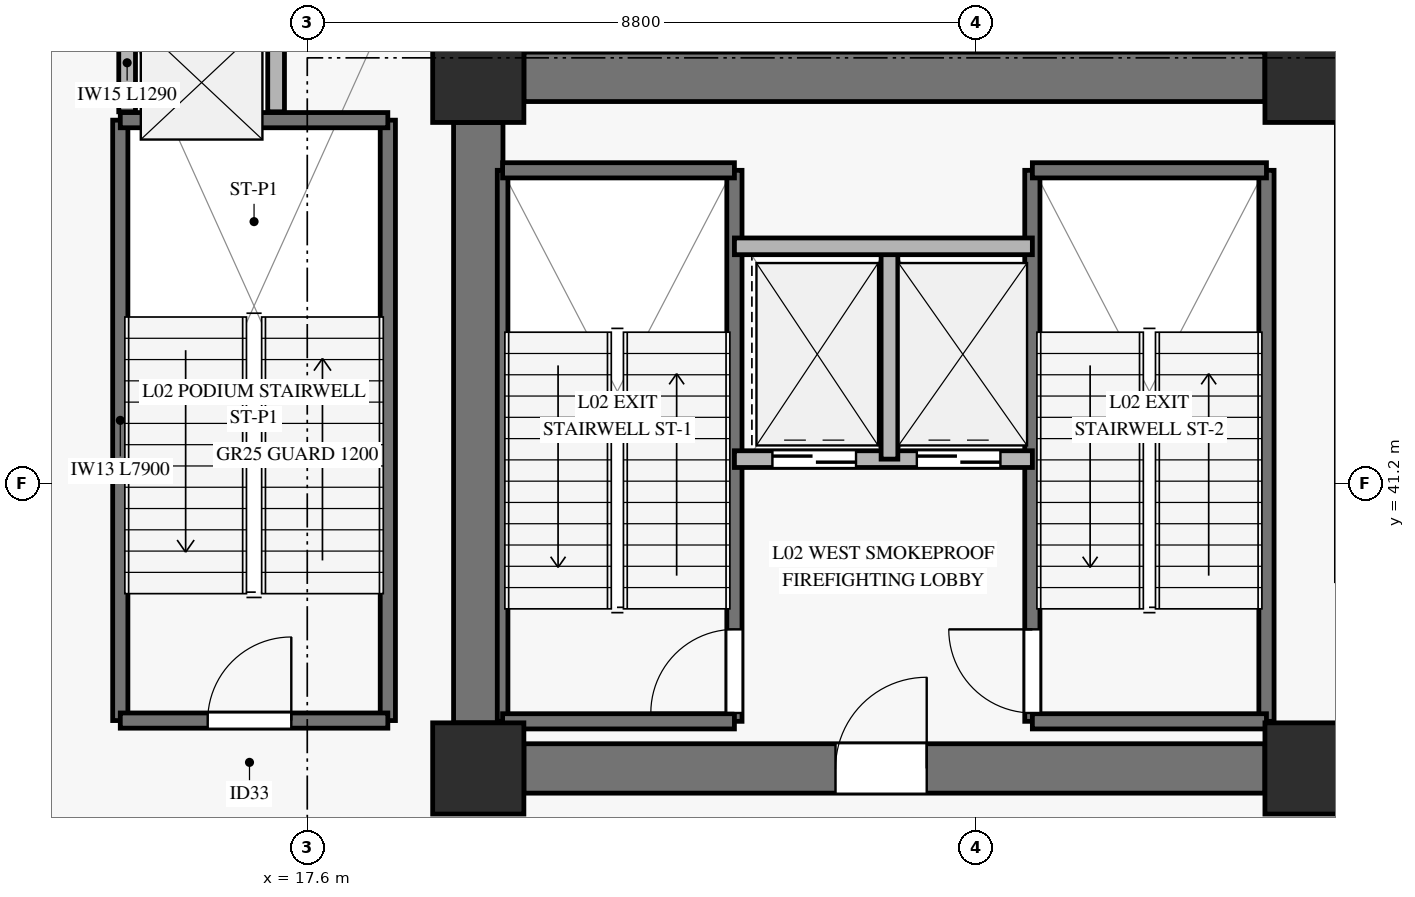
"""IFC4 building model, lengths in metres.
Left out: names, types, materials, properties, quantities, classifications, styles, units other than length and angle.
Written with IfcOpenShell. Run it as: python <this file> out.ifc"""

import sys

from ifc_helpers import new_model, si_unit, direction, frame, frame_2d, origin, origin_2d, place, context, subcontext, project, spatial, rectangle, extrude, source, transform, mapped, element, fill, save


model = new_model("IFC4")
c1 = context("Model", 3, precision=1e-05, world=origin(), true_north=direction((0.0, 1.0)))
c2 = subcontext(c1, "Body", "Model", "MODEL_VIEW")
j1 = project(units=[si_unit("LENGTHUNIT", "METRE"), si_unit("PLANEANGLEUNIT", "RADIAN")], contexts=[c1])
p1 = place(None, origin())
s1 = spatial("IfcSite", under=j1, at=p1, CompositionType="ELEMENT")
p2 = place(p1, origin())
s2 = spatial("IfcBuilding", under=s1, at=p2, CompositionType="ELEMENT")
p3 = place(p2, frame((0.0, 0.0, 5.6)))
s3 = spatial("IfcBuildingStorey", under=s2, at=p3, CompositionType="ELEMENT", Elevation=5.6)
m1 = source(origin(), c2, "Body", "SweptSolid", [
    extrude(rectangle(XDim=1.2, YDim=1.2, at=origin_2d()), origin(), (0.0, 0.0, 1.0), 4.54),
])
for number, where, z_axis, x_axis in (
    (1, (19.85, 37.45, 0.0), (0.0, 0.0, 1.0), (1.0, 0.0, 0.0)),
    (2, (19.85, 46.55, 0.0), (0.0, 0.0, 1.0), (1.0, 0.0, 0.0)),
    (3, (30.8, 37.45, 0.0), (0.0, 0.0, 1.0), (1.0, 0.0, 0.0)),
    (4, (30.8, 46.55, 0.0), (0.0, 0.0, 1.0), (1.0, 0.0, 0.0)),
):
    element("IfcColumn", number, at=place(p3, frame(where, z_axis=z_axis, x_axis=x_axis)), inside=s3, PredefinedType="PILASTER", context=c2, shape_type="MappedRepresentation", body=[
        mapped(m1, transform((0.0, 0.0, 0.0), x_axis=(1.0, 0.0, 0.0), y_axis=(0.0, 1.0, 0.0), z_axis=(0.0, 0.0, 1.0), scale=1.0)),
    ])
p4 = place(p3, frame((20.45, 46.55, 0.0), z_axis=(0.0, 0.0, 1.0), x_axis=(1.0, 0.0, 0.0)))
e5 = element("IfcWall", 5, at=p4, inside=s3, PredefinedType="SHEAR", context=c2, shape_type="SweptSolid", body=[
    extrude(rectangle(XDim=9.75, YDim=0.65, at=frame_2d((4.875, 0.0))), origin(), (0.0, 0.0, 1.0), 4.54),
])
p5 = place(p3, frame((20.45, 37.45, 0.0), z_axis=(0.0, 0.0, 1.0), x_axis=(1.0, 0.0, 0.0)))
e6 = element("IfcWall", 6, at=p5, inside=s3, PredefinedType="SHEAR", context=c2, shape_type="SweptSolid", body=[
    extrude(rectangle(XDim=9.75, YDim=0.65, at=frame_2d((4.875, 0.0))), origin(), (0.0, 0.0, 1.0), 4.54),
])
p6 = place(p5, frame((4.1, 0.0, 0.0)))
e7 = element("IfcOpeningElement", 7, at=p6, cuts=e6, PredefinedType="OPENING", context=c2, shape_type="SweptSolid", body=[
    extrude(rectangle(XDim=1.2, YDim=2.15, at=frame_2d((0.6, 1.075))), frame((0.0, 0.335, 0.0), z_axis=(0.0, -1.0, 0.0), x_axis=(1.0, 0.0, 0.0)), (0.0, 0.0, 1.0), 0.67),
])
p7 = place(p3, frame((19.85, 38.05, 0.0), z_axis=(0.0, 0.0, 1.0), x_axis=(0.0, 1.0, 0.0)))
e8 = element("IfcWall", 8, at=p7, inside=s3, PredefinedType="SHEAR", context=c2, shape_type="SweptSolid", body=[
    extrude(rectangle(XDim=7.9, YDim=0.65, at=frame_2d((3.95, 0.0))), origin(), (0.0, 0.0, 1.0), 4.54),
])
p8 = place(p3, frame((20.17, 38.07, 0.0), z_axis=(0.0, 0.0, 1.0), x_axis=(0.0, 1.0, 0.0)))
e9 = element("IfcWall", 9, at=p8, inside=s3, PredefinedType="SOLIDWALL", context=c2, shape_type="SweptSolid", body=[
    extrude(rectangle(XDim=7.25, YDim=0.14, at=frame_2d((3.625, 0.0))), origin(), (0.0, 0.0, 1.0), 4.8),
])
p9 = place(p3, frame((23.22, 38.07, 0.0), z_axis=(0.0, 0.0, 1.0), x_axis=(0.0, 1.0, 0.0)))
e10 = element("IfcWall", 10, at=p9, inside=s3, PredefinedType="SOLIDWALL", context=c2, shape_type="SweptSolid", body=[
    extrude(rectangle(XDim=7.25, YDim=0.2, at=frame_2d((3.625, 0.0))), origin(), (0.0, 0.0, 1.0), 4.8),
])
p10 = place(p9, frame((0.11, 0.0, 0.0)))
e11 = element("IfcOpeningElement", 11, at=p10, cuts=e10, PredefinedType="OPENING", context=c2, shape_type="SweptSolid", body=[
    extrude(rectangle(XDim=1.1, YDim=2.15, at=frame_2d((0.55, 1.075))), frame((0.0, 0.11, 0.0), z_axis=(0.0, -1.0, 0.0), x_axis=(1.0, 0.0, 0.0)), (0.0, 0.0, 1.0), 0.22),
])
for number, where, z_axis, x_axis in (
    (12, (20.17, 45.32, 0.0), (0.0, 0.0, 1.0), (1.0, 0.0, 0.0)),
    (13, (20.17, 38.07, 0.0), (0.0, 0.0, 1.0), (1.0, 0.0, 0.0)),
):
    element("IfcWall", number, at=place(p3, frame(where, z_axis=z_axis, x_axis=x_axis)), inside=s3, PredefinedType="SOLIDWALL", context=c2, shape_type="SweptSolid", body=[
        extrude(rectangle(XDim=3.05, YDim=0.2, at=frame_2d((1.525, 0.0))), origin(), (0.0, 0.0, 1.0), 4.8),
    ])
p11 = place(p3, frame((27.14, 38.07, 0.0), z_axis=(0.0, 0.0, 1.0), x_axis=(0.0, 1.0, 0.0)))
e14 = element("IfcWall", 14, at=p11, inside=s3, PredefinedType="SOLIDWALL", context=c2, shape_type="SweptSolid", body=[
    extrude(rectangle(XDim=7.25, YDim=0.2, at=frame_2d((3.625, 0.0))), origin(), (0.0, 0.0, 1.0), 4.8),
])
p12 = place(p11, frame((0.11, 0.0, 0.0)))
e15 = element("IfcOpeningElement", 15, at=p12, cuts=e14, PredefinedType="OPENING", context=c2, shape_type="SweptSolid", body=[
    extrude(rectangle(XDim=1.1, YDim=2.15, at=frame_2d((0.55, 1.075))), frame((0.0, 0.11, 0.0), z_axis=(0.0, -1.0, 0.0), x_axis=(1.0, 0.0, 0.0)), (0.0, 0.0, 1.0), 0.22),
])
p13 = place(p3, frame((30.22, 38.07, 0.0), z_axis=(0.0, 0.0, 1.0), x_axis=(0.0, 1.0, 0.0)))
e16 = element("IfcWall", 16, at=p13, inside=s3, PredefinedType="SOLIDWALL", context=c2, shape_type="SweptSolid", body=[
    extrude(rectangle(XDim=7.25, YDim=0.2, at=frame_2d((3.625, 0.0))), origin(), (0.0, 0.0, 1.0), 4.8),
])
for number, where, z_axis, x_axis in (
    (17, (27.14, 45.32, 0.0), (0.0, 0.0, 1.0), (1.0, 0.0, 0.0)),
    (18, (27.14, 38.07, 0.0), (0.0, 0.0, 1.0), (1.0, 0.0, 0.0)),
):
    element("IfcWall", number, at=place(p3, frame(where, z_axis=z_axis, x_axis=x_axis)), inside=s3, PredefinedType="SOLIDWALL", context=c2, shape_type="SweptSolid", body=[
        extrude(rectangle(XDim=3.08, YDim=0.2, at=frame_2d((1.54, 0.0))), origin(), (0.0, 0.0, 1.0), 4.8),
    ])
p14 = place(p3, frame((23.22, 41.52, 0.0), z_axis=(0.0, 0.0, 1.0), x_axis=(1.0, 0.0, 0.0)))
e19 = element("IfcWall", 19, at=p14, inside=s3, PredefinedType="SOLIDWALL", context=c2, shape_type="SweptSolid", body=[
    extrude(rectangle(XDim=3.92, YDim=0.22, at=frame_2d((1.96, 0.0))), origin(), (0.0, 0.0, 1.0), 4.54),
])
p15 = place(p14, frame((0.5, 0.0, 0.0)))
e20 = element("IfcOpeningElement", 20, at=p15, cuts=e19, PredefinedType="OPENING", context=c2, shape_type="SweptSolid", body=[
    extrude(rectangle(XDim=1.1, YDim=2.2, at=frame_2d((0.55, 1.1))), frame((0.0, 0.12, 0.0), z_axis=(0.0, -1.0, 0.0), x_axis=(1.0, 0.0, 0.0)), (0.0, 0.0, 1.0), 0.24),
])
p16 = place(p14, frame((2.4, 0.0, 0.0)))
e21 = element("IfcOpeningElement", 21, at=p16, cuts=e19, PredefinedType="OPENING", context=c2, shape_type="SweptSolid", body=[
    extrude(rectangle(XDim=1.1, YDim=2.2, at=frame_2d((0.55, 1.1))), frame((0.0, 0.12, 0.0), z_axis=(0.0, -1.0, 0.0), x_axis=(1.0, 0.0, 0.0)), (0.0, 0.0, 1.0), 0.24),
])
p17 = place(p3, frame((25.26, 41.52, 0.0), z_axis=(0.0, 0.0, 1.0), x_axis=(0.0, 1.0, 0.0)))
e22 = element("IfcWall", 22, at=p17, inside=s3, PredefinedType="SOLIDWALL", context=c2, shape_type="SweptSolid", body=[
    extrude(rectangle(XDim=2.8, YDim=0.22, at=frame_2d((1.4, 0.0))), origin(), (0.0, 0.0, 1.0), 4.54),
])
p18 = place(p3, frame((23.22, 44.32, 0.0), z_axis=(0.0, 0.0, 1.0), x_axis=(1.0, 0.0, 0.0)))
e23 = element("IfcWall", 23, at=p18, inside=s3, PredefinedType="SOLIDWALL", context=c2, shape_type="SweptSolid", body=[
    extrude(rectangle(XDim=3.92, YDim=0.22, at=frame_2d((1.96, 0.0))), origin(), (0.0, 0.0, 1.0), 4.54),
])
for number, where, z_axis, x_axis in (
    (24, (15.14, 38.08, 0.0), (0.0, 0.0, 1.0), (0.0, 1.0, 0.0)),
    (25, (18.66, 38.08, 0.0), (0.0, 0.0, 1.0), (0.0, 1.0, 0.0)),
):
    element("IfcWall", number, at=place(p3, frame(where, z_axis=z_axis, x_axis=x_axis)), inside=s3, PredefinedType="SOLIDWALL", context=c2, shape_type="SweptSolid", body=[
        extrude(rectangle(XDim=7.9, YDim=0.2, at=frame_2d((3.95, 0.0))), origin(), (0.0, 0.0, 1.0), 4.8),
    ])
p19 = place(p3, frame((15.14, 45.98, 0.0), z_axis=(0.0, 0.0, 1.0), x_axis=(1.0, 0.0, 0.0)))
e26 = element("IfcWall", 26, at=p19, inside=s3, PredefinedType="SOLIDWALL", context=c2, shape_type="SweptSolid", body=[
    extrude(rectangle(XDim=3.52, YDim=0.2, at=frame_2d((1.76, 0.0))), origin(), (0.0, 0.0, 1.0), 4.8),
])
p20 = place(p3, frame((15.14, 38.08, 0.0), z_axis=(0.0, 0.0, 1.0), x_axis=(1.0, 0.0, 0.0)))
e27 = element("IfcWall", 27, at=p20, inside=s3, PredefinedType="SOLIDWALL", context=c2, shape_type="SweptSolid", body=[
    extrude(rectangle(XDim=3.52, YDim=0.2, at=frame_2d((1.76, 0.0))), origin(), (0.0, 0.0, 1.0), 4.8),
])
p21 = place(p20, frame((1.15, 0.0, 0.0)))
e28 = element("IfcOpeningElement", 28, at=p21, cuts=e27, PredefinedType="OPENING", context=c2, shape_type="SweptSolid", body=[
    extrude(rectangle(XDim=1.1, YDim=2.15, at=frame_2d((0.55, 1.075))), frame((0.0, 0.11, 0.0), z_axis=(0.0, -1.0, 0.0), x_axis=(1.0, 0.0, 0.0)), (0.0, 0.0, 1.0), 0.22),
])
for number, where, z_axis, x_axis in (
    (29, (15.23, 46.09, 0.0), (0.0, 0.0, 1.0), (0.0, 1.0, 0.0)),
    (30, (17.19, 46.09, 0.0), (0.0, 0.0, 1.0), (0.0, 1.0, 0.0)),
):
    element("IfcWall", number, at=place(p3, frame(where, z_axis=z_axis, x_axis=x_axis)), inside=s3, PredefinedType="SOLIDWALL", context=c2, shape_type="SweptSolid", body=[
        extrude(rectangle(XDim=1.29, YDim=0.22, at=frame_2d((0.645, 0.0))), origin(), (0.0, 0.0, 1.0), 4.54),
    ])
m2 = source(origin(), c2, "Body", "SweptSolid", [
    extrude(rectangle(XDim=1.1, YDim=2.15, at=frame_2d((0.55, 1.075))), frame((0.0, 0.025, 0.0), z_axis=(0.0, -1.0, 0.0), x_axis=(1.0, 0.0, 0.0)), (0.0, 0.0, 1.0), 0.05),
])
p22 = place(p10, origin())
e31 = element("IfcDoor", 31, at=p22, inside=s3, OperationType="SINGLE_SWING_LEFT", PredefinedType="DOOR", context=c2, shape_type="MappedRepresentation", body=[
    mapped(m2, transform((0.0, 0.0, 0.0), x_axis=(1.0, 0.0, 0.0), y_axis=(0.0, 1.0, 0.0), z_axis=(0.0, 0.0, 1.0), scale=1.0)),
])
fill(e11, e31)
p23 = place(p12, origin())
e32 = element("IfcDoor", 32, at=p23, inside=s3, OperationType="SINGLE_SWING_RIGHT", PredefinedType="DOOR", context=c2, shape_type="MappedRepresentation", body=[
    mapped(m2, transform((0.0, 0.0, 0.0), x_axis=(1.0, 0.0, 0.0), y_axis=(0.0, 1.0, 0.0), z_axis=(0.0, 0.0, 1.0), scale=1.0)),
])
fill(e15, e32)
m3 = source(origin(), c2, "Body", "SweptSolid", [
    extrude(rectangle(XDim=1.1, YDim=2.2, at=frame_2d((0.55, 1.1))), frame((0.0, 0.025, 0.0), z_axis=(0.0, -1.0, 0.0), x_axis=(1.0, 0.0, 0.0)), (0.0, 0.0, 1.0), 0.05),
])
p24 = place(p15, origin())
e33 = element("IfcDoor", 33, at=p24, inside=s3, OperationType="SLIDING_TO_LEFT", PredefinedType="DOOR", context=c2, shape_type="MappedRepresentation", body=[
    mapped(m3, transform((0.0, 0.0, 0.0), x_axis=(1.0, 0.0, 0.0), y_axis=(0.0, 1.0, 0.0), z_axis=(0.0, 0.0, 1.0), scale=1.0)),
])
fill(e20, e33)
p25 = place(p16, origin())
e34 = element("IfcDoor", 34, at=p25, inside=s3, OperationType="SLIDING_TO_LEFT", PredefinedType="DOOR", context=c2, shape_type="MappedRepresentation", body=[
    mapped(m3, transform((0.0, 0.0, 0.0), x_axis=(1.0, 0.0, 0.0), y_axis=(0.0, 1.0, 0.0), z_axis=(0.0, 0.0, 1.0), scale=1.0)),
])
fill(e21, e34)
m4 = source(origin(), c2, "Body", "SweptSolid", [
    extrude(rectangle(XDim=1.2, YDim=2.15, at=frame_2d((0.6, 1.075))), frame((0.0, 0.025, 0.0), z_axis=(0.0, -1.0, 0.0), x_axis=(1.0, 0.0, 0.0)), (0.0, 0.0, 1.0), 0.05),
])
p26 = place(p6, origin())
e35 = element("IfcDoor", 35, at=p26, inside=s3, OperationType="SINGLE_SWING_RIGHT", PredefinedType="DOOR", context=c2, shape_type="MappedRepresentation", body=[
    mapped(m4, transform((0.0, 0.0, 0.0), x_axis=(1.0, 0.0, 0.0), y_axis=(0.0, 1.0, 0.0), z_axis=(0.0, 0.0, 1.0), scale=1.0)),
])
fill(e7, e35)
p27 = place(p21, origin())
e36 = element("IfcDoor", 36, at=p27, inside=s3, OperationType="SINGLE_SWING_RIGHT", PredefinedType="DOOR", context=c2, shape_type="MappedRepresentation", body=[
    mapped(m2, transform((0.0, 0.0, 0.0), x_axis=(1.0, 0.0, 0.0), y_axis=(0.0, 1.0, 0.0), z_axis=(0.0, 0.0, 1.0), scale=1.0)),
])
fill(e28, e36)
save(model, sys.argv[1])
